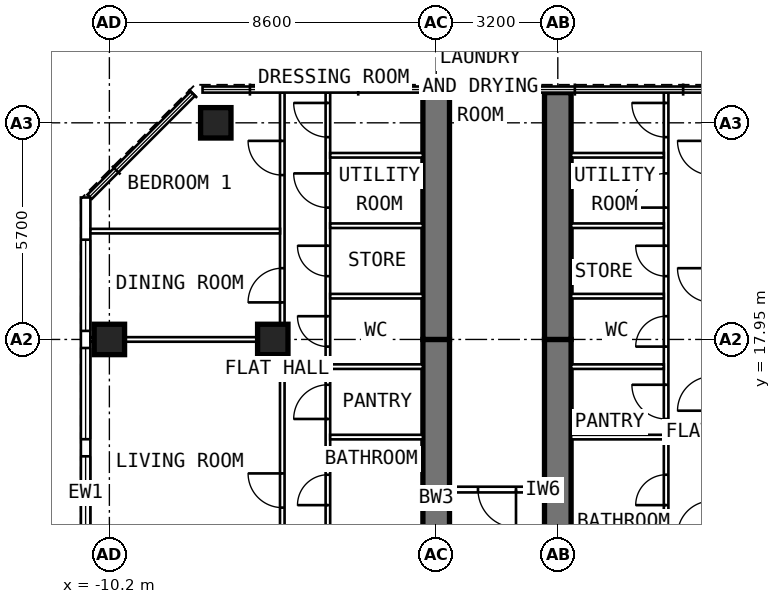
"""IFC4 building model, lengths in metres.
Left out: names, types, materials, properties, quantities, classifications, styles, units other than length and angle.
Written with IfcOpenShell. Run it as: python <this file> out.ifc"""

import sys

from ifc_helpers import new_model, si_unit, direction, frame, frame_2d, origin, origin_2d, place, context, subcontext, project, spatial, rectangle, extrude, element, fill, save


model = new_model("IFC4")
c1 = context("Model", 3, precision=1e-05, world=origin(), true_north=direction((0.0, 1.0)))
c2 = subcontext(c1, "Body", "Model", "MODEL_VIEW")
j1 = project(units=[si_unit("LENGTHUNIT", "METRE"), si_unit("PLANEANGLEUNIT", "RADIAN")], contexts=[c1])
p1 = place(None, origin())
s1 = spatial("IfcSite", under=j1, at=p1, CompositionType="ELEMENT")
p2 = place(p1, origin())
s2 = spatial("IfcBuilding", under=s1, at=p2, CompositionType="ELEMENT")
p3 = place(p2, frame((0.0, 0.0, 296.2)))
s3 = spatial("IfcBuildingStorey", under=s2, at=p3, CompositionType="ELEMENT", Elevation=296.2)
for number, where, z_axis, x_axis in (
    (1, (-10.2, 17.95, 0.0), (0.0, 0.0, 1.0), (0.0, 1.0, 0.0)),
    (2, (-7.4, 23.65, 0.0), (0.0, 0.0, 1.0), (0.0, 1.0, 0.0)),
    (3, (-5.9, 17.95, 0.0), (0.0, 0.0, 1.0), (0.0, 1.0, 0.0)),
):
    element("IfcColumn", number, at=place(p3, frame(where, z_axis=z_axis, x_axis=x_axis)), inside=s3, PredefinedType="COLUMN", context=c2, shape_type="SweptSolid", body=[
        extrude(rectangle(XDim=0.8, YDim=0.8, at=origin_2d()), origin(), (0.0, 0.0, 1.0), 4.8),
    ])
p4 = place(p3, frame((-1.6, 9.6, 0.0), z_axis=(0.0, 0.0, 1.0), x_axis=(0.0, 1.0, 0.0)))
e4 = element("IfcWall", 4, at=p4, inside=s3, PredefinedType="SHEAR", context=c2, shape_type="SweptSolid", body=[
    extrude(rectangle(XDim=8.35, YDim=0.7, at=frame_2d((4.175, 0.0))), origin(), (0.0, 0.0, 1.0), 4.8),
])
p5 = place(p4, frame((1.3, 0.0, 0.0)))
e5 = element("IfcOpeningElement", 5, at=p5, cuts=e4, PredefinedType="OPENING", context=c2, shape_type="SweptSolid", body=[
    extrude(rectangle(XDim=1.0, YDim=2.1, at=frame_2d((0.5, 1.05))), frame((0.0, 0.362, 0.0), z_axis=(0.0, -1.0, 0.0), x_axis=(1.0, 0.0, 0.0)), (0.0, 0.0, 1.0), 0.724),
])
p6 = place(p3, frame((-1.6, 17.95, 0.0), z_axis=(0.0, 0.0, 1.0), x_axis=(0.0, 1.0, 0.0)))
e6 = element("IfcWall", 6, at=p6, inside=s3, PredefinedType="SHEAR", context=c2, shape_type="SweptSolid", body=[
    extrude(rectangle(XDim=6.495, YDim=0.7, at=frame_2d((3.248, 0.0))), origin(), (0.0, 0.0, 1.0), 4.8),
])
p7 = place(p3, frame((1.6, 9.6, 0.0), z_axis=(0.0, 0.0, 1.0), x_axis=(0.0, 1.0, 0.0)))
e7 = element("IfcWall", 7, at=p7, inside=s3, PredefinedType="SHEAR", context=c2, shape_type="SweptSolid", body=[
    extrude(rectangle(XDim=8.35, YDim=0.7, at=frame_2d((4.175, 0.0))), origin(), (0.0, 0.0, 1.0), 4.8),
])
p8 = place(p7, frame((1.3, 0.0, 0.0)))
e8 = element("IfcOpeningElement", 8, at=p8, cuts=e7, PredefinedType="OPENING", context=c2, shape_type="SweptSolid", body=[
    extrude(rectangle(XDim=1.0, YDim=2.1, at=frame_2d((0.5, 1.05))), frame((0.0, 0.362, 0.0), z_axis=(0.0, -1.0, 0.0), x_axis=(1.0, 0.0, 0.0)), (0.0, 0.0, 1.0), 0.724),
])
p9 = place(p3, frame((1.6, 17.95, 0.0), z_axis=(0.0, 0.0, 1.0), x_axis=(0.0, 1.0, 0.0)))
e9 = element("IfcWall", 9, at=p9, inside=s3, PredefinedType="SHEAR", context=c2, shape_type="SweptSolid", body=[
    extrude(rectangle(XDim=6.495, YDim=0.7, at=frame_2d((3.248, 0.0))), origin(), (0.0, 0.0, 1.0), 4.8),
])
p10 = place(p3, frame((-10.825, 6.148, 0.0), z_axis=(0.0, 0.0, 1.0), x_axis=(0.0, 1.0, 0.0)))
e10 = element("IfcWall", 10, at=p10, inside=s3, PredefinedType="SOLIDWALL", context=c2, shape_type="SweptSolid", body=[
    extrude(rectangle(XDim=15.537, YDim=0.25, at=frame_2d((7.769, 0.0))), origin(), (0.0, 0.0, 1.0), 4.5),
])
p11 = place(p10, frame((0.627, 0.0, 0.6)))
e11 = element("IfcOpeningElement", 11, at=p11, cuts=e10, PredefinedType="OPENING", context=c2, shape_type="SweptSolid", body=[
    extrude(rectangle(XDim=2.4, YDim=2.0, at=frame_2d((1.2, 1.0))), frame((0.0, 0.137, 0.0), z_axis=(0.0, -1.0, 0.0), x_axis=(1.0, 0.0, 0.0)), (0.0, 0.0, 1.0), 0.274),
])
p12 = place(p10, frame((3.477, 0.0, 0.6)))
e12 = element("IfcOpeningElement", 12, at=p12, cuts=e10, PredefinedType="OPENING", context=c2, shape_type="SweptSolid", body=[
    extrude(rectangle(XDim=2.4, YDim=2.0, at=frame_2d((1.2, 1.0))), frame((0.0, 0.137, 0.0), z_axis=(0.0, -1.0, 0.0), x_axis=(1.0, 0.0, 0.0)), (0.0, 0.0, 1.0), 0.274),
])
p13 = place(p10, frame((6.327, 0.0, 0.6)))
e13 = element("IfcOpeningElement", 13, at=p13, cuts=e10, PredefinedType="OPENING", context=c2, shape_type="SweptSolid", body=[
    extrude(rectangle(XDim=2.4, YDim=2.0, at=frame_2d((1.2, 1.0))), frame((0.0, 0.137, 0.0), z_axis=(0.0, -1.0, 0.0), x_axis=(1.0, 0.0, 0.0)), (0.0, 0.0, 1.0), 0.274),
])
p14 = place(p10, frame((9.177, 0.0, 0.6)))
e14 = element("IfcOpeningElement", 14, at=p14, cuts=e10, PredefinedType="OPENING", context=c2, shape_type="SweptSolid", body=[
    extrude(rectangle(XDim=2.4, YDim=2.0, at=frame_2d((1.2, 1.0))), frame((0.0, 0.137, 0.0), z_axis=(0.0, -1.0, 0.0), x_axis=(1.0, 0.0, 0.0)), (0.0, 0.0, 1.0), 0.274),
])
p15 = place(p10, frame((12.027, 0.0, 0.6)))
e15 = element("IfcOpeningElement", 15, at=p15, cuts=e10, PredefinedType="OPENING", context=c2, shape_type="SweptSolid", body=[
    extrude(rectangle(XDim=2.4, YDim=2.0, at=frame_2d((1.2, 1.0))), frame((0.0, 0.137, 0.0), z_axis=(0.0, -1.0, 0.0), x_axis=(1.0, 0.0, 0.0)), (0.0, 0.0, 1.0), 0.274),
])
p16 = place(p3, frame((-4.45, 9.85, 0.0), z_axis=(0.0, 0.0, 1.0), x_axis=(0.0, 1.0, 0.0)))
e16 = element("IfcWall", 16, at=p16, inside=s3, PredefinedType="PARTITIONING", context=c2, shape_type="SweptSolid", body=[
    extrude(rectangle(XDim=14.595, YDim=0.12, at=frame_2d((7.297, 0.0))), origin(), (0.0, 0.0, 1.0), 4.5),
])
p17 = place(p16, frame((1.0, 0.0, 0.0)))
e17 = element("IfcOpeningElement", 17, at=p17, cuts=e16, PredefinedType="OPENING", context=c2, shape_type="SweptSolid", body=[
    extrude(rectangle(XDim=0.9, YDim=2.1, at=frame_2d((0.45, 1.05))), frame((0.0, 0.072, 0.0), z_axis=(0.0, -1.0, 0.0), x_axis=(1.0, 0.0, 0.0)), (0.0, 0.0, 1.0), 0.144),
])
p18 = place(p16, frame((3.74, 0.0, 0.0)))
e18 = element("IfcOpeningElement", 18, at=p18, cuts=e16, PredefinedType="OPENING", context=c2, shape_type="SweptSolid", body=[
    extrude(rectangle(XDim=0.8, YDim=2.1, at=frame_2d((0.4, 1.05))), frame((0.0, 0.072, 0.0), z_axis=(0.0, -1.0, 0.0), x_axis=(1.0, 0.0, 0.0)), (0.0, 0.0, 1.0), 0.144),
])
p19 = place(p16, frame((6.008, 0.0, 0.0)))
e19 = element("IfcOpeningElement", 19, at=p19, cuts=e16, PredefinedType="OPENING", context=c2, shape_type="SweptSolid", body=[
    extrude(rectangle(XDim=0.9, YDim=2.1, at=frame_2d((0.45, 1.05))), frame((0.0, 0.072, 0.0), z_axis=(0.0, -1.0, 0.0), x_axis=(1.0, 0.0, 0.0)), (0.0, 0.0, 1.0), 0.144),
])
p20 = place(p16, frame((7.912, 0.0, 0.0)))
e20 = element("IfcOpeningElement", 20, at=p20, cuts=e16, PredefinedType="OPENING", context=c2, shape_type="SweptSolid", body=[
    extrude(rectangle(XDim=0.8, YDim=2.1, at=frame_2d((0.4, 1.05))), frame((0.0, 0.072, 0.0), z_axis=(0.0, -1.0, 0.0), x_axis=(1.0, 0.0, 0.0)), (0.0, 0.0, 1.0), 0.144),
])
p21 = place(p16, frame((9.765, 0.0, 0.0)))
e21 = element("IfcOpeningElement", 21, at=p21, cuts=e16, PredefinedType="OPENING", context=c2, shape_type="SweptSolid", body=[
    extrude(rectangle(XDim=0.8, YDim=2.1, at=frame_2d((0.4, 1.05))), frame((0.0, 0.072, 0.0), z_axis=(0.0, -1.0, 0.0), x_axis=(1.0, 0.0, 0.0)), (0.0, 0.0, 1.0), 0.144),
])
p22 = place(p16, frame((11.569, 0.0, 0.0)))
e22 = element("IfcOpeningElement", 22, at=p22, cuts=e16, PredefinedType="OPENING", context=c2, shape_type="SweptSolid", body=[
    extrude(rectangle(XDim=0.9, YDim=2.1, at=frame_2d((0.45, 1.05))), frame((0.0, 0.072, 0.0), z_axis=(0.0, -1.0, 0.0), x_axis=(1.0, 0.0, 0.0)), (0.0, 0.0, 1.0), 0.144),
])
p23 = place(p16, frame((13.423, 0.0, 0.0)))
e23 = element("IfcOpeningElement", 23, at=p23, cuts=e16, PredefinedType="OPENING", context=c2, shape_type="SweptSolid", body=[
    extrude(rectangle(XDim=0.9, YDim=2.1, at=frame_2d((0.45, 1.05))), frame((0.0, 0.072, 0.0), z_axis=(0.0, -1.0, 0.0), x_axis=(1.0, 0.0, 0.0)), (0.0, 0.0, 1.0), 0.144),
])
p24 = place(p3, frame((-5.65, 9.6, 0.0), z_axis=(0.0, 0.0, 1.0), x_axis=(0.0, 1.0, 0.0)))
e24 = element("IfcWall", 24, at=p24, inside=s3, PredefinedType="PARTITIONING", context=c2, shape_type="SweptSolid", body=[
    extrude(rectangle(XDim=14.845, YDim=0.12, at=frame_2d((7.422, 0.0))), origin(), (0.0, 0.0, 1.0), 4.5),
])
p25 = place(p24, frame((3.925, 0.0, 0.0)))
e25 = element("IfcOpeningElement", 25, at=p25, cuts=e24, PredefinedType="OPENING", context=c2, shape_type="SweptSolid", body=[
    extrude(rectangle(XDim=0.9, YDim=2.1, at=frame_2d((0.45, 1.05))), frame((0.0, 0.072, 0.0), z_axis=(0.0, -1.0, 0.0), x_axis=(1.0, 0.0, 0.0)), (0.0, 0.0, 1.0), 0.144),
])
p26 = place(p24, frame((9.325, 0.0, 0.0)))
e26 = element("IfcOpeningElement", 26, at=p26, cuts=e24, PredefinedType="OPENING", context=c2, shape_type="SweptSolid", body=[
    extrude(rectangle(XDim=0.9, YDim=2.1, at=frame_2d((0.45, 1.05))), frame((0.0, 0.072, 0.0), z_axis=(0.0, -1.0, 0.0), x_axis=(1.0, 0.0, 0.0)), (0.0, 0.0, 1.0), 0.144),
])
p27 = place(p24, frame((12.675, 0.0, 0.0)))
e27 = element("IfcOpeningElement", 27, at=p27, cuts=e24, PredefinedType="OPENING", context=c2, shape_type="SweptSolid", body=[
    extrude(rectangle(XDim=0.9, YDim=2.1, at=frame_2d((0.45, 1.05))), frame((0.0, 0.072, 0.0), z_axis=(0.0, -1.0, 0.0), x_axis=(1.0, 0.0, 0.0)), (0.0, 0.0, 1.0), 0.144),
])
p28 = place(p3, frame((-5.71, 17.95, 0.0), z_axis=(0.0, 0.0, 1.0), x_axis=(-1.0, 0.0, 0.0)))
e28 = element("IfcWall", 28, at=p28, inside=s3, PredefinedType="PARTITIONING", context=c2, shape_type="SweptSolid", body=[
    extrude(rectangle(XDim=4.99, YDim=0.12, at=frame_2d((2.495, 0.0))), origin(), (0.0, 0.0, 1.0), 3.6),
])
p29 = place(p3, frame((-5.71, 20.8, 0.0), z_axis=(0.0, 0.0, 1.0), x_axis=(-1.0, 0.0, 0.0)))
e29 = element("IfcWall", 29, at=p29, inside=s3, PredefinedType="PARTITIONING", context=c2, shape_type="SweptSolid", body=[
    extrude(rectangle(XDim=4.99, YDim=0.12, at=frame_2d((2.495, 0.0))), origin(), (0.0, 0.0, 1.0), 4.5),
])
for number, where, z_axis, x_axis in (
    (30, (-1.95, 15.381, 0.0), (0.0, 0.0, 1.0), (-1.0, 0.0, 0.0)),
    (31, (-1.95, 17.235, 0.0), (0.0, 0.0, 1.0), (-1.0, 0.0, 0.0)),
    (32, (-1.95, 19.088, 0.0), (0.0, 0.0, 1.0), (-1.0, 0.0, 0.0)),
    (33, (-1.95, 20.942, 0.0), (0.0, 0.0, 1.0), (-1.0, 0.0, 0.0)),
    (34, (-1.95, 22.796, 0.0), (0.0, 0.0, 1.0), (-1.0, 0.0, 0.0)),
):
    element("IfcWall", number, at=place(p3, frame(where, z_axis=z_axis, x_axis=x_axis)), inside=s3, PredefinedType="PARTITIONING", context=c2, shape_type="SweptSolid", body=[
        extrude(rectangle(XDim=2.44, YDim=0.12, at=frame_2d((1.22, 0.0))), origin(), (0.0, 0.0, 1.0), 4.5),
    ])
p30 = place(p3, frame((4.45, 9.85, 0.0), z_axis=(0.0, 0.0, 1.0), x_axis=(0.0, 1.0, 0.0)))
e35 = element("IfcWall", 35, at=p30, inside=s3, PredefinedType="PARTITIONING", context=c2, shape_type="SweptSolid", body=[
    extrude(rectangle(XDim=14.595, YDim=0.12, at=frame_2d((7.297, 0.0))), origin(), (0.0, 0.0, 1.0), 4.5),
])
p31 = place(p30, frame((1.0, 0.0, 0.0)))
e36 = element("IfcOpeningElement", 36, at=p31, cuts=e35, PredefinedType="OPENING", context=c2, shape_type="SweptSolid", body=[
    extrude(rectangle(XDim=0.9, YDim=2.1, at=frame_2d((0.45, 1.05))), frame((0.0, 0.072, 0.0), z_axis=(0.0, -1.0, 0.0), x_axis=(1.0, 0.0, 0.0)), (0.0, 0.0, 1.0), 0.144),
])
p32 = place(p30, frame((3.74, 0.0, 0.0)))
e37 = element("IfcOpeningElement", 37, at=p32, cuts=e35, PredefinedType="OPENING", context=c2, shape_type="SweptSolid", body=[
    extrude(rectangle(XDim=0.8, YDim=2.1, at=frame_2d((0.4, 1.05))), frame((0.0, 0.072, 0.0), z_axis=(0.0, -1.0, 0.0), x_axis=(1.0, 0.0, 0.0)), (0.0, 0.0, 1.0), 0.144),
])
p33 = place(p30, frame((6.008, 0.0, 0.0)))
e38 = element("IfcOpeningElement", 38, at=p33, cuts=e35, PredefinedType="OPENING", context=c2, shape_type="SweptSolid", body=[
    extrude(rectangle(XDim=0.9, YDim=2.1, at=frame_2d((0.45, 1.05))), frame((0.0, 0.072, 0.0), z_axis=(0.0, -1.0, 0.0), x_axis=(1.0, 0.0, 0.0)), (0.0, 0.0, 1.0), 0.144),
])
p34 = place(p30, frame((7.912, 0.0, 0.0)))
e39 = element("IfcOpeningElement", 39, at=p34, cuts=e35, PredefinedType="OPENING", context=c2, shape_type="SweptSolid", body=[
    extrude(rectangle(XDim=0.8, YDim=2.1, at=frame_2d((0.4, 1.05))), frame((0.0, 0.072, 0.0), z_axis=(0.0, -1.0, 0.0), x_axis=(1.0, 0.0, 0.0)), (0.0, 0.0, 1.0), 0.144),
])
p35 = place(p30, frame((9.765, 0.0, 0.0)))
e40 = element("IfcOpeningElement", 40, at=p35, cuts=e35, PredefinedType="OPENING", context=c2, shape_type="SweptSolid", body=[
    extrude(rectangle(XDim=0.8, YDim=2.1, at=frame_2d((0.4, 1.05))), frame((0.0, 0.072, 0.0), z_axis=(0.0, -1.0, 0.0), x_axis=(1.0, 0.0, 0.0)), (0.0, 0.0, 1.0), 0.144),
])
p36 = place(p30, frame((11.569, 0.0, 0.0)))
e41 = element("IfcOpeningElement", 41, at=p36, cuts=e35, PredefinedType="OPENING", context=c2, shape_type="SweptSolid", body=[
    extrude(rectangle(XDim=0.9, YDim=2.1, at=frame_2d((0.45, 1.05))), frame((0.0, 0.072, 0.0), z_axis=(0.0, -1.0, 0.0), x_axis=(1.0, 0.0, 0.0)), (0.0, 0.0, 1.0), 0.144),
])
p37 = place(p30, frame((13.423, 0.0, 0.0)))
e42 = element("IfcOpeningElement", 42, at=p37, cuts=e35, PredefinedType="OPENING", context=c2, shape_type="SweptSolid", body=[
    extrude(rectangle(XDim=0.9, YDim=2.1, at=frame_2d((0.45, 1.05))), frame((0.0, 0.072, 0.0), z_axis=(0.0, -1.0, 0.0), x_axis=(1.0, 0.0, 0.0)), (0.0, 0.0, 1.0), 0.144),
])
for number, where, z_axis, x_axis in (
    (43, (1.95, 15.381, 0.0), (0.0, 0.0, 1.0), (1.0, 0.0, 0.0)),
    (44, (1.95, 17.235, 0.0), (0.0, 0.0, 1.0), (1.0, 0.0, 0.0)),
    (45, (1.95, 19.088, 0.0), (0.0, 0.0, 1.0), (1.0, 0.0, 0.0)),
    (46, (1.95, 20.942, 0.0), (0.0, 0.0, 1.0), (1.0, 0.0, 0.0)),
    (47, (1.95, 22.796, 0.0), (0.0, 0.0, 1.0), (1.0, 0.0, 0.0)),
):
    element("IfcWall", number, at=place(p3, frame(where, z_axis=z_axis, x_axis=x_axis)), inside=s3, PredefinedType="PARTITIONING", context=c2, shape_type="SweptSolid", body=[
        extrude(rectangle(XDim=2.44, YDim=0.12, at=frame_2d((1.22, 0.0))), origin(), (0.0, 0.0, 1.0), 4.5),
    ])
p38 = place(p3, frame((1.25, 14.0, 0.0), z_axis=(0.0, 0.0, 1.0), x_axis=(-1.0, 0.0, 0.0)))
e48 = element("IfcWall", 48, at=p38, inside=s3, PredefinedType="PARTITIONING", context=c2, shape_type="SweptSolid", body=[
    extrude(rectangle(XDim=2.5, YDim=0.15, at=frame_2d((1.25, 0.0))), origin(), (0.0, 0.0, 1.0), 4.5),
])
p39 = place(p38, frame((0.75, 0.0, 0.0)))
e49 = element("IfcOpeningElement", 49, at=p39, cuts=e48, PredefinedType="OPENING", context=c2, shape_type="SweptSolid", body=[
    extrude(rectangle(XDim=1.0, YDim=2.1, at=frame_2d((0.5, 1.05))), frame((0.0, 0.087, 0.0), z_axis=(0.0, -1.0, 0.0), x_axis=(1.0, 0.0, 0.0)), (0.0, 0.0, 1.0), 0.174),
])
p40 = place(p13, origin())
e50 = element("IfcWindow", 50, at=p40, inside=s3, PartitioningType="SINGLE_PANEL", PredefinedType="WINDOW", context=c2, shape_type="SweptSolid", body=[
    extrude(rectangle(XDim=2.4, YDim=2.0, at=frame_2d((1.2, 1.0))), frame((0.0, 0.03, 0.0), z_axis=(0.0, -1.0, 0.0), x_axis=(1.0, 0.0, 0.0)), (0.0, 0.0, 1.0), 0.06),
])
fill(e13, e50)
p41 = place(p14, origin())
e51 = element("IfcWindow", 51, at=p41, inside=s3, PartitioningType="SINGLE_PANEL", PredefinedType="WINDOW", context=c2, shape_type="SweptSolid", body=[
    extrude(rectangle(XDim=2.4, YDim=2.0, at=frame_2d((1.2, 1.0))), frame((0.0, 0.03, 0.0), z_axis=(0.0, -1.0, 0.0), x_axis=(1.0, 0.0, 0.0)), (0.0, 0.0, 1.0), 0.06),
])
fill(e14, e51)
p42 = place(p15, origin())
e52 = element("IfcWindow", 52, at=p42, inside=s3, PartitioningType="SINGLE_PANEL", PredefinedType="WINDOW", context=c2, shape_type="SweptSolid", body=[
    extrude(rectangle(XDim=2.4, YDim=2.0, at=frame_2d((1.2, 1.0))), frame((0.0, 0.03, 0.0), z_axis=(0.0, -1.0, 0.0), x_axis=(1.0, 0.0, 0.0)), (0.0, 0.0, 1.0), 0.06),
])
fill(e15, e52)
p43 = place(p25, origin())
e53 = element("IfcDoor", 53, at=p43, inside=s3, OperationType="SINGLE_SWING_RIGHT", PredefinedType="DOOR", context=c2, shape_type="SweptSolid", body=[
    extrude(rectangle(XDim=0.9, YDim=2.1, at=frame_2d((0.45, 1.05))), frame((0.0, 0.025, 0.0), z_axis=(0.0, -1.0, 0.0), x_axis=(1.0, 0.0, 0.0)), (0.0, 0.0, 1.0), 0.05),
])
fill(e25, e53)
p44 = place(p26, origin())
e54 = element("IfcDoor", 54, at=p44, inside=s3, OperationType="SINGLE_SWING_LEFT", PredefinedType="DOOR", context=c2, shape_type="SweptSolid", body=[
    extrude(rectangle(XDim=0.9, YDim=2.1, at=frame_2d((0.45, 1.05))), frame((0.0, 0.025, 0.0), z_axis=(0.0, -1.0, 0.0), x_axis=(1.0, 0.0, 0.0)), (0.0, 0.0, 1.0), 0.05),
])
fill(e26, e54)
p45 = place(p27, origin())
e55 = element("IfcDoor", 55, at=p45, inside=s3, OperationType="SINGLE_SWING_RIGHT", PredefinedType="DOOR", context=c2, shape_type="SweptSolid", body=[
    extrude(rectangle(XDim=0.9, YDim=2.1, at=frame_2d((0.45, 1.05))), frame((0.0, 0.025, 0.0), z_axis=(0.0, -1.0, 0.0), x_axis=(1.0, 0.0, 0.0)), (0.0, 0.0, 1.0), 0.05),
])
fill(e27, e55)
p46 = place(p18, origin())
e56 = element("IfcDoor", 56, at=p46, inside=s3, OperationType="SINGLE_SWING_LEFT", PredefinedType="DOOR", context=c2, shape_type="SweptSolid", body=[
    extrude(rectangle(XDim=0.8, YDim=2.1, at=frame_2d((0.4, 1.05))), frame((0.0, 0.025, 0.0), z_axis=(0.0, -1.0, 0.0), x_axis=(1.0, 0.0, 0.0)), (0.0, 0.0, 1.0), 0.05),
])
fill(e18, e56)
p47 = place(p19, origin())
e57 = element("IfcDoor", 57, at=p47, inside=s3, OperationType="SINGLE_SWING_LEFT", PredefinedType="DOOR", context=c2, shape_type="SweptSolid", body=[
    extrude(rectangle(XDim=0.9, YDim=2.1, at=frame_2d((0.45, 1.05))), frame((0.0, 0.025, 0.0), z_axis=(0.0, -1.0, 0.0), x_axis=(1.0, 0.0, 0.0)), (0.0, 0.0, 1.0), 0.05),
])
fill(e19, e57)
p48 = place(p20, origin())
e58 = element("IfcDoor", 58, at=p48, inside=s3, OperationType="SINGLE_SWING_RIGHT", PredefinedType="DOOR", context=c2, shape_type="SweptSolid", body=[
    extrude(rectangle(XDim=0.8, YDim=2.1, at=frame_2d((0.4, 1.05))), frame((0.0, 0.025, 0.0), z_axis=(0.0, -1.0, 0.0), x_axis=(1.0, 0.0, 0.0)), (0.0, 0.0, 1.0), 0.05),
])
fill(e20, e58)
p49 = place(p21, origin())
e59 = element("IfcDoor", 59, at=p49, inside=s3, OperationType="SINGLE_SWING_RIGHT", PredefinedType="DOOR", context=c2, shape_type="SweptSolid", body=[
    extrude(rectangle(XDim=0.8, YDim=2.1, at=frame_2d((0.4, 1.05))), frame((0.0, 0.025, 0.0), z_axis=(0.0, -1.0, 0.0), x_axis=(1.0, 0.0, 0.0)), (0.0, 0.0, 1.0), 0.05),
])
fill(e21, e59)
p50 = place(p22, origin())
e60 = element("IfcDoor", 60, at=p50, inside=s3, OperationType="SINGLE_SWING_RIGHT", PredefinedType="DOOR", context=c2, shape_type="SweptSolid", body=[
    extrude(rectangle(XDim=0.9, YDim=2.1, at=frame_2d((0.45, 1.05))), frame((0.0, 0.025, 0.0), z_axis=(0.0, -1.0, 0.0), x_axis=(1.0, 0.0, 0.0)), (0.0, 0.0, 1.0), 0.05),
])
fill(e22, e60)
p51 = place(p23, origin())
e61 = element("IfcDoor", 61, at=p51, inside=s3, OperationType="SINGLE_SWING_RIGHT", PredefinedType="DOOR", context=c2, shape_type="SweptSolid", body=[
    extrude(rectangle(XDim=0.9, YDim=2.1, at=frame_2d((0.45, 1.05))), frame((0.0, 0.025, 0.0), z_axis=(0.0, -1.0, 0.0), x_axis=(1.0, 0.0, 0.0)), (0.0, 0.0, 1.0), 0.05),
])
fill(e23, e61)
p52 = place(p32, origin())
e62 = element("IfcDoor", 62, at=p52, inside=s3, OperationType="SINGLE_SWING_LEFT", PredefinedType="DOOR", context=c2, shape_type="SweptSolid", body=[
    extrude(rectangle(XDim=0.8, YDim=2.1, at=frame_2d((0.4, 1.05))), frame((0.0, 0.025, 0.0), z_axis=(0.0, -1.0, 0.0), x_axis=(1.0, 0.0, 0.0)), (0.0, 0.0, 1.0), 0.05),
])
fill(e37, e62)
p53 = place(p33, origin())
e63 = element("IfcDoor", 63, at=p53, inside=s3, OperationType="SINGLE_SWING_RIGHT", PredefinedType="DOOR", context=c2, shape_type="SweptSolid", body=[
    extrude(rectangle(XDim=0.9, YDim=2.1, at=frame_2d((0.45, 1.05))), frame((0.0, 0.025, 0.0), z_axis=(0.0, -1.0, 0.0), x_axis=(1.0, 0.0, 0.0)), (0.0, 0.0, 1.0), 0.05),
])
fill(e38, e63)
p54 = place(p34, origin())
e64 = element("IfcDoor", 64, at=p54, inside=s3, OperationType="SINGLE_SWING_LEFT", PredefinedType="DOOR", context=c2, shape_type="SweptSolid", body=[
    extrude(rectangle(XDim=0.8, YDim=2.1, at=frame_2d((0.4, 1.05))), frame((0.0, 0.025, 0.0), z_axis=(0.0, -1.0, 0.0), x_axis=(1.0, 0.0, 0.0)), (0.0, 0.0, 1.0), 0.05),
])
fill(e39, e64)
p55 = place(p35, origin())
e65 = element("IfcDoor", 65, at=p55, inside=s3, OperationType="SINGLE_SWING_RIGHT", PredefinedType="DOOR", context=c2, shape_type="SweptSolid", body=[
    extrude(rectangle(XDim=0.8, YDim=2.1, at=frame_2d((0.4, 1.05))), frame((0.0, 0.025, 0.0), z_axis=(0.0, -1.0, 0.0), x_axis=(1.0, 0.0, 0.0)), (0.0, 0.0, 1.0), 0.05),
])
fill(e40, e65)
p56 = place(p36, origin())
e66 = element("IfcDoor", 66, at=p56, inside=s3, OperationType="SINGLE_SWING_LEFT", PredefinedType="DOOR", context=c2, shape_type="SweptSolid", body=[
    extrude(rectangle(XDim=0.9, YDim=2.1, at=frame_2d((0.45, 1.05))), frame((0.0, 0.025, 0.0), z_axis=(0.0, -1.0, 0.0), x_axis=(1.0, 0.0, 0.0)), (0.0, 0.0, 1.0), 0.05),
])
fill(e41, e66)
p57 = place(p37, origin())
e67 = element("IfcDoor", 67, at=p57, inside=s3, OperationType="SINGLE_SWING_RIGHT", PredefinedType="DOOR", context=c2, shape_type="SweptSolid", body=[
    extrude(rectangle(XDim=0.9, YDim=2.1, at=frame_2d((0.45, 1.05))), frame((0.0, 0.025, 0.0), z_axis=(0.0, -1.0, 0.0), x_axis=(1.0, 0.0, 0.0)), (0.0, 0.0, 1.0), 0.05),
])
fill(e42, e67)
p58 = place(p39, origin())
e68 = element("IfcDoor", 68, at=p58, inside=s3, OperationType="SINGLE_SWING_LEFT", PredefinedType="DOOR", context=c2, shape_type="SweptSolid", body=[
    extrude(rectangle(XDim=1.0, YDim=2.1, at=frame_2d((0.5, 1.05))), frame((0.0, 0.025, 0.0), z_axis=(0.0, -1.0, 0.0), x_axis=(1.0, 0.0, 0.0)), (0.0, 0.0, 1.0), 0.05),
])
fill(e49, e68)
save(model, sys.argv[1])
